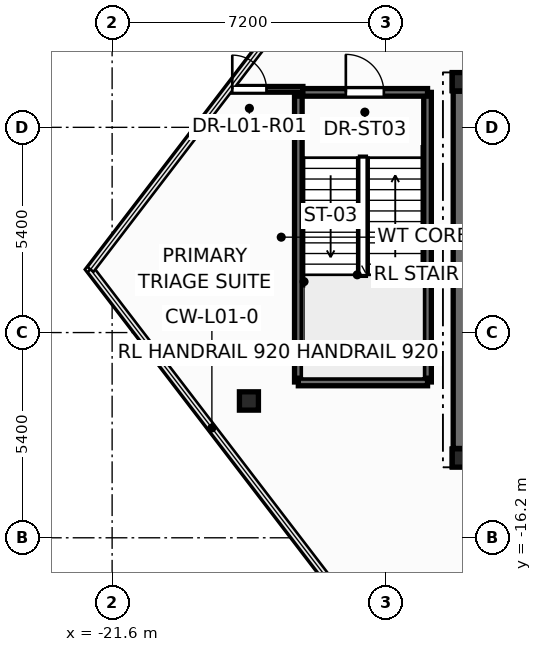
"""IFC4 building model, lengths in metres.
Left out: names, types, materials, properties, quantities, classifications, styles, units other than length and angle.
Written with IfcOpenShell. Run it as: python <this file> out.ifc"""

import sys

from ifc_helpers import new_model, si_unit, direction, frame, frame_2d, origin, origin_2d, place, context, subcontext, project, spatial, rectangle, i_section, extrude, element, fill, save


model = new_model("IFC4")
c1 = context("Model", 3, precision=1e-05, world=origin(), true_north=direction((0.0, 1.0)))
c2 = subcontext(c1, "Body", "Model", "MODEL_VIEW")
j1 = project(units=[si_unit("LENGTHUNIT", "METRE"), si_unit("PLANEANGLEUNIT", "RADIAN")], contexts=[c1])
p1 = place(None, origin())
s1 = spatial("IfcSite", under=j1, at=p1, CompositionType="ELEMENT")
p2 = place(p1, origin())
s2 = spatial("IfcBuilding", under=s1, at=p2, CompositionType="ELEMENT")
p3 = place(p2, frame((0.0, 0.0, 5.4)))
s3 = spatial("IfcBuildingStorey", under=s2, at=p3, CompositionType="ELEMENT", Elevation=5.4)
for number, where, z_axis, x_axis in (
    (1, (-12.4, -14.1, 0.0), (0.0, 0.0, 1.0), (1.0, 0.0, 0.0)),
    (2, (-12.4, -4.2, 0.0), (0.0, 0.0, 1.0), (1.0, 0.0, 0.0)),
    (3, (-18.0, -12.6, 0.0), (0.0, 0.0, 1.0), (1.0, 0.0, 0.0)),
):
    element("IfcColumn", number, at=place(p3, frame(where, z_axis=z_axis, x_axis=x_axis)), inside=s3, PredefinedType="COLUMN", context=c2, shape_type="SweptSolid", body=[
        extrude(i_section(OverallWidth=0.5, OverallDepth=0.482, WebThickness=0.04, FlangeThickness=0.045, at=origin_2d()), origin(), (0.0, 0.0, 1.0), 4.5),
    ])
p4 = place(p3, frame((-12.65, -14.1, 0.0), z_axis=(0.0, 0.0, 1.0), x_axis=(1.0, 0.0, 0.0)))
e4 = element("IfcWall", 4, at=p4, inside=s3, PredefinedType="SHEAR", context=c2, shape_type="SweptSolid", body=[
    extrude(rectangle(XDim=25.3, YDim=0.45, at=frame_2d((12.65, 0.0))), origin(), (0.0, 0.0, 1.0), 4.5),
])
p5 = place(p3, frame((-12.65, -4.2, 0.0), z_axis=(0.0, 0.0, 1.0), x_axis=(1.0, 0.0, 0.0)))
e5 = element("IfcWall", 5, at=p5, inside=s3, PredefinedType="SHEAR", context=c2, shape_type="SweptSolid", body=[
    extrude(rectangle(XDim=25.3, YDim=0.45, at=frame_2d((12.65, 0.0))), origin(), (0.0, 0.0, 1.0), 4.5),
])
p6 = place(p5, frame((1.85, 0.0, 0.0)))
e6 = element("IfcOpeningElement", 6, at=p6, cuts=e5, PredefinedType="OPENING", context=c2, shape_type="SweptSolid", body=[
    extrude(rectangle(XDim=0.756, YDim=2.054, at=frame_2d((0.375, 1.027))), frame((0.0, 0.235, 0.0), z_axis=(0.0, -1.0, 0.0), x_axis=(1.0, 0.0, 0.0)), (0.0, 0.0, 1.0), 0.47),
])
p7 = place(p5, frame((21.85, 0.0, 0.0)))
e7 = element("IfcOpeningElement", 7, at=p7, cuts=e5, PredefinedType="OPENING", context=c2, shape_type="SweptSolid", body=[
    extrude(rectangle(XDim=0.756, YDim=2.054, at=frame_2d((0.375, 1.027))), frame((0.0, 0.235, 0.0), z_axis=(0.0, -1.0, 0.0), x_axis=(1.0, 0.0, 0.0)), (0.0, 0.0, 1.0), 0.47),
])
p8 = place(p5, frame((23.5, 0.0, 0.0)))
e8 = element("IfcOpeningElement", 8, at=p8, cuts=e5, PredefinedType="OPENING", context=c2, shape_type="SweptSolid", body=[
    extrude(rectangle(XDim=0.756, YDim=2.054, at=frame_2d((0.375, 1.027))), frame((0.0, 0.235, 0.0), z_axis=(0.0, -1.0, 0.0), x_axis=(1.0, 0.0, 0.0)), (0.0, 0.0, 1.0), 0.47),
])
p9 = place(p5, frame((5.85, 0.0, 0.0)))
e9 = element("IfcOpeningElement", 9, at=p9, cuts=e5, PredefinedType="OPENING", context=c2, shape_type="SweptSolid", body=[
    extrude(rectangle(XDim=1.006, YDim=2.104, at=frame_2d((0.5, 1.052))), frame((0.0, 0.235, 0.0), z_axis=(0.0, -1.0, 0.0), x_axis=(1.0, 0.0, 0.0)), (0.0, 0.0, 1.0), 0.47),
])
p10 = place(p5, frame((10.35, 0.0, 0.0)))
e10 = element("IfcOpeningElement", 10, at=p10, cuts=e5, PredefinedType="OPENING", context=c2, shape_type="SweptSolid", body=[
    extrude(rectangle(XDim=1.406, YDim=2.154, at=frame_2d((0.7, 1.077))), frame((0.0, 0.235, 0.0), z_axis=(0.0, -1.0, 0.0), x_axis=(1.0, 0.0, 0.0)), (0.0, 0.0, 1.0), 0.47),
])
p11 = place(p5, frame((18.45, 0.0, 0.0)))
e11 = element("IfcOpeningElement", 11, at=p11, cuts=e5, PredefinedType="OPENING", context=c2, shape_type="SweptSolid", body=[
    extrude(rectangle(XDim=1.006, YDim=2.104, at=frame_2d((0.5, 1.052))), frame((0.0, 0.235, 0.0), z_axis=(0.0, -1.0, 0.0), x_axis=(1.0, 0.0, 0.0)), (0.0, 0.0, 1.0), 0.47),
])
p12 = place(p3, frame((-12.4, -13.85, 0.0), z_axis=(0.0, 0.0, 1.0), x_axis=(0.0, 1.0, 0.0)))
e12 = element("IfcWall", 12, at=p12, inside=s3, PredefinedType="SHEAR", context=c2, shape_type="SweptSolid", body=[
    extrude(rectangle(XDim=9.4, YDim=0.45, at=frame_2d((4.7, 0.0))), origin(), (0.0, 0.0, 1.0), 4.5),
])
for number, where, z_axis, x_axis in (
    (13, (-16.7, -12.1, 0.0), (0.0, 0.0, 1.0), (0.0, 1.0, 0.0)),
    (14, (-13.3, -12.1, 0.0), (0.0, 0.0, 1.0), (0.0, 1.0, 0.0)),
):
    element("IfcWall", number, at=place(p3, frame(where, z_axis=z_axis, x_axis=x_axis)), inside=s3, PredefinedType="SOLIDWALL", context=c2, shape_type="SweptSolid", body=[
        extrude(rectangle(XDim=7.62, YDim=0.2, at=frame_2d((3.81, 0.0))), origin(), (0.0, 0.0, 1.0), 4.5),
    ])
p13 = place(p3, frame((-16.7, -12.1, 0.0), z_axis=(0.0, 0.0, 1.0), x_axis=(1.0, 0.0, 0.0)))
e15 = element("IfcWall", 15, at=p13, inside=s3, PredefinedType="SOLIDWALL", context=c2, shape_type="SweptSolid", body=[
    extrude(rectangle(XDim=3.4, YDim=0.2, at=frame_2d((1.7, 0.0))), origin(), (0.0, 0.0, 1.0), 4.5),
])
p14 = place(p3, frame((-16.7, -4.48, 0.0), z_axis=(0.0, 0.0, 1.0), x_axis=(1.0, 0.0, 0.0)))
e16 = element("IfcWall", 16, at=p14, inside=s3, PredefinedType="SOLIDWALL", context=c2, shape_type="SweptSolid", body=[
    extrude(rectangle(XDim=3.4, YDim=0.2, at=frame_2d((1.7, 0.0))), origin(), (0.0, 0.0, 1.0), 4.5),
])
p15 = place(p14, frame((1.25, 0.0, 0.0)))
e17 = element("IfcOpeningElement", 17, at=p15, cuts=e16, PredefinedType="OPENING", context=c2, shape_type="SweptSolid", body=[
    extrude(rectangle(XDim=1.006, YDim=2.104, at=frame_2d((0.5, 1.052))), frame((0.0, 0.11, 0.0), z_axis=(0.0, -1.0, 0.0), x_axis=(1.0, 0.0, 0.0)), (0.0, 0.0, 1.0), 0.22),
])
p16 = place(p3, frame((-18.538, -4.4, 0.0), z_axis=(0.0, 0.0, 1.0), x_axis=(1.0, 0.0, 0.0)))
e18 = element("IfcWall", 18, at=p16, inside=s3, PredefinedType="PARTITIONING", context=c2, shape_type="SweptSolid", body=[
    extrude(rectangle(XDim=1.958, YDim=0.15, at=frame_2d((0.979, 0.0))), origin(), (0.0, 0.0, 1.0), 4.068),
])
p17 = place(p16, frame((0.1, 0.0, 0.0)))
e19 = element("IfcOpeningElement", 19, at=p17, cuts=e18, PredefinedType="OPENING", context=c2, shape_type="SweptSolid", body=[
    extrude(rectangle(XDim=0.906, YDim=2.104, at=frame_2d((0.45, 1.052))), frame((0.0, 0.085, 0.0), z_axis=(0.0, -1.0, 0.0), x_axis=(1.0, 0.0, 0.0)), (0.0, 0.0, 1.0), 0.17),
])
p18 = place(p15, origin())
e20 = element("IfcDoor", 20, at=p18, inside=s3, OperationType="SINGLE_SWING_LEFT", PredefinedType="DOOR", context=c2, shape_type="SweptSolid", body=[
    extrude(rectangle(XDim=1.0, YDim=2.1, at=frame_2d((0.5, 1.05))), frame((0.0, 0.025, 0.0), z_axis=(0.0, -1.0, 0.0), x_axis=(1.0, 0.0, 0.0)), (0.0, 0.0, 1.0), 0.05),
])
fill(e17, e20)
p19 = place(p17, origin())
e21 = element("IfcDoor", 21, at=p19, inside=s3, OperationType="SINGLE_SWING_LEFT", PredefinedType="DOOR", context=c2, shape_type="SweptSolid", body=[
    extrude(rectangle(XDim=0.9, YDim=2.1, at=frame_2d((0.45, 1.05))), frame((0.0, 0.025, 0.0), z_axis=(0.0, -1.0, 0.0), x_axis=(1.0, 0.0, 0.0)), (0.0, 0.0, 1.0), 0.05),
])
fill(e19, e21)
save(model, sys.argv[1])
